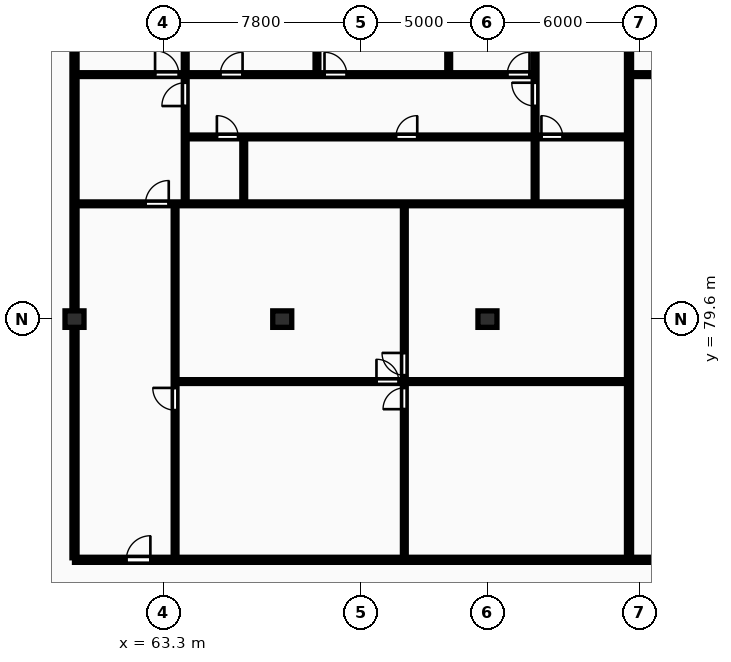
"""IFC4 building model, lengths in metres.
Left out: names, types, materials, properties, quantities, classifications, styles, units other than length and angle.
Written with IfcOpenShell. Run it as: python <this file> out.ifc"""

import sys

from ifc_helpers import new_model, si_unit, direction, frame, frame_2d, origin, origin_2d, place, context, subcontext, project, spatial, rectangle, extrude, element, fill, save


model = new_model("IFC4")
c1 = context("Model", 3, precision=1e-05, world=origin(), true_north=direction((0.0, 1.0)))
c2 = subcontext(c1, "Body", "Model", "MODEL_VIEW")
j1 = project(units=[si_unit("LENGTHUNIT", "METRE"), si_unit("PLANEANGLEUNIT", "RADIAN")], contexts=[c1])
p1 = place(None, origin())
s1 = spatial("IfcSite", under=j1, at=p1, CompositionType="ELEMENT")
p2 = place(p1, origin())
s2 = spatial("IfcBuilding", under=s1, at=p2, CompositionType="ELEMENT")
p3 = place(p2, frame((0.0, 0.0, 235.55)))
s3 = spatial("IfcBuildingStorey", under=s2, at=p3, CompositionType="ELEMENT", Elevation=235.55)
for number, where, z_axis, x_axis in (
    (1, (59.8, 79.6, 0.0), (0.0, 0.0, 1.0), (1.0, 0.0, 0.0)),
    (2, (68.0, 79.6, 0.0), (0.0, 0.0, 1.0), (1.0, 0.0, 0.0)),
    (3, (76.1, 79.6, 0.0), (0.0, 0.0, 1.0), (1.0, 0.0, 0.0)),
):
    element("IfcColumn", number, at=place(p3, frame(where, z_axis=z_axis, x_axis=x_axis)), inside=s3, PredefinedType="COLUMN", context=c2, shape_type="SweptSolid", body=[
        extrude(rectangle(XDim=0.75, YDim=0.65, at=origin_2d()), origin(), (0.0, 0.0, 1.0), 3.45),
    ])
p4 = place(p3, frame((59.8, 70.18, 0.0), z_axis=(0.0, 0.0, 1.0), x_axis=(0.0, 1.0, 0.0)))
e4 = element("IfcWall", 4, at=p4, inside=s3, PredefinedType="PARTITIONING", context=c2, shape_type="SweptSolid", body=[
    extrude(rectangle(XDim=24.32, YDim=0.2, at=frame_2d((12.16, 0.0))), origin(), (0.0, 0.0, 1.0), 2.477),
])
p5 = place(p3, frame((81.687, 70.18, 0.0), z_axis=(0.0, 0.0, 1.0), x_axis=(0.0, 1.0, 0.0)))
e5 = element("IfcWall", 5, at=p5, inside=s3, PredefinedType="PARTITIONING", context=c2, shape_type="SweptSolid", body=[
    extrude(rectangle(XDim=24.32, YDim=0.2, at=frame_2d((12.16, 0.0))), origin(), (0.0, 0.0, 1.0), 3.17),
])
p6 = place(p3, frame((72.819, 70.16, 0.0), z_axis=(0.0, 0.0, 1.0), x_axis=(0.0, 1.0, 0.0)))
e6 = element("IfcWall", 6, at=p6, inside=s3, PredefinedType="PARTITIONING", context=c2, shape_type="SweptSolid", body=[
    extrude(rectangle(XDim=13.95, YDim=0.15, at=frame_2d((6.975, 0.0))), origin(), (0.0, 0.0, 1.0), 3.17),
])
p7 = place(p6, frame((5.885, 0.0, 0.0)))
e7 = element("IfcOpeningElement", 7, at=p7, cuts=e6, PredefinedType="OPENING", context=c2, shape_type="SweptSolid", body=[
    extrude(rectangle(XDim=0.84, YDim=2.04, at=frame_2d((0.42, 1.02))), frame((0.0, 0.085, 0.0), z_axis=(0.0, -1.0, 0.0), x_axis=(1.0, 0.0, 0.0)), (0.0, 0.0, 1.0), 0.17),
])
p8 = place(p6, frame((7.225, 0.0, 0.0)))
e8 = element("IfcOpeningElement", 8, at=p8, cuts=e6, PredefinedType="OPENING", context=c2, shape_type="SweptSolid", body=[
    extrude(rectangle(XDim=0.88, YDim=2.06, at=frame_2d((0.44, 1.03))), frame((0.0, 0.085, 0.0), z_axis=(0.0, -1.0, 0.0), x_axis=(1.0, 0.0, 0.0)), (0.0, 0.0, 1.0), 0.17),
])
p9 = place(p3, frame((63.83, 77.135, 0.0), z_axis=(0.0, 0.0, 1.0), x_axis=(1.0, 0.0, 0.0)))
e9 = element("IfcWall", 9, at=p9, inside=s3, PredefinedType="PARTITIONING", context=c2, shape_type="SweptSolid", body=[
    extrude(rectangle(XDim=17.777, YDim=0.15, at=frame_2d((8.889, 0.0))), origin(), (0.0, 0.0, 1.0), 3.17),
])
p10 = place(p9, frame((7.889, 0.0, 0.0)))
e10 = element("IfcOpeningElement", 10, at=p10, cuts=e9, PredefinedType="OPENING", context=c2, shape_type="SweptSolid", body=[
    extrude(rectangle(XDim=0.88, YDim=2.06, at=frame_2d((0.44, 1.03))), frame((0.0, 0.085, 0.0), z_axis=(0.0, -1.0, 0.0), x_axis=(1.0, 0.0, 0.0)), (0.0, 0.0, 1.0), 0.17),
])
p11 = place(p3, frame((63.77, 70.16, 0.0), z_axis=(0.0, 0.0, 1.0), x_axis=(0.0, 1.0, 0.0)))
e11 = element("IfcWall", 11, at=p11, inside=s3, PredefinedType="PARTITIONING", context=c2, shape_type="SweptSolid", body=[
    extrude(rectangle(XDim=13.95, YDim=0.15, at=frame_2d((6.975, 0.0))), origin(), (0.0, 0.0, 1.0), 3.17),
])
p12 = place(p11, frame((5.845, 0.0, 0.0)))
e12 = element("IfcOpeningElement", 12, at=p12, cuts=e11, PredefinedType="OPENING", context=c2, shape_type="SweptSolid", body=[
    extrude(rectangle(XDim=0.88, YDim=2.06, at=frame_2d((0.44, 1.03))), frame((0.0, 0.085, 0.0), z_axis=(0.0, -1.0, 0.0), x_axis=(1.0, 0.0, 0.0)), (0.0, 0.0, 1.0), 0.17),
])
p13 = place(p3, frame((66.48, 84.19, 0.0), z_axis=(0.0, 0.0, 1.0), x_axis=(0.0, 1.0, 0.0)))
e13 = element("IfcWall", 13, at=p13, inside=s3, PredefinedType="PARTITIONING", context=c2, shape_type="SweptSolid", body=[
    extrude(rectangle(XDim=2.58, YDim=0.15, at=frame_2d((1.29, 0.0))), origin(), (0.0, 0.0, 1.0), 3.17),
])
for number, where, z_axis, x_axis in (
    (14, (69.37, 89.33, 0.0), (0.0, 0.0, 1.0), (0.0, 1.0, 0.0)),
    (15, (74.57, 89.33, 0.0), (0.0, 0.0, 1.0), (0.0, 1.0, 0.0)),
):
    element("IfcWall", number, at=place(p3, frame(where, z_axis=z_axis, x_axis=x_axis)), inside=s3, PredefinedType="PARTITIONING", context=c2, shape_type="SweptSolid", body=[
        extrude(rectangle(XDim=5.17, YDim=0.15, at=frame_2d((2.585, 0.0))), origin(), (0.0, 0.0, 1.0), 3.17),
    ])
p14 = place(p3, frame((64.17, 84.19, 0.0), z_axis=(0.0, 0.0, 1.0), x_axis=(0.0, 1.0, 0.0)))
e16 = element("IfcWall", 16, at=p14, inside=s3, PredefinedType="PARTITIONING", context=c2, shape_type="SweptSolid", body=[
    extrude(rectangle(XDim=10.31, YDim=0.15, at=frame_2d((5.155, 0.0))), origin(), (0.0, 0.0, 1.0), 3.17),
])
p15 = place(p14, frame((3.82, 0.0, 0.0)))
e17 = element("IfcOpeningElement", 17, at=p15, cuts=e16, PredefinedType="OPENING", context=c2, shape_type="SweptSolid", body=[
    extrude(rectangle(XDim=0.92, YDim=2.08, at=frame_2d((0.46, 1.04))), frame((0.0, 0.085, 0.0), z_axis=(0.0, -1.0, 0.0), x_axis=(1.0, 0.0, 0.0)), (0.0, 0.0, 1.0), 0.17),
])
p16 = place(p3, frame((77.98, 84.19, 0.0), z_axis=(0.0, 0.0, 1.0), x_axis=(0.0, 1.0, 0.0)))
e18 = element("IfcWall", 18, at=p16, inside=s3, PredefinedType="PARTITIONING", context=c2, shape_type="SweptSolid", body=[
    extrude(rectangle(XDim=2.58, YDim=0.15, at=frame_2d((1.29, 0.0))), origin(), (0.0, 0.0, 1.0), 3.17),
])
p17 = place(p3, frame((77.98, 86.81, 0.0), z_axis=(0.0, 0.0, 1.0), x_axis=(0.0, 1.0, 0.0)))
e19 = element("IfcWall", 19, at=p17, inside=s3, PredefinedType="PARTITIONING", context=c2, shape_type="SweptSolid", body=[
    extrude(rectangle(XDim=7.69, YDim=0.15, at=frame_2d((3.845, 0.0))), origin(), (0.0, 0.0, 1.0), 3.17),
])
p18 = place(p17, frame((1.2, 0.0, 0.0)))
e20 = element("IfcOpeningElement", 20, at=p18, cuts=e19, PredefinedType="OPENING", context=c2, shape_type="SweptSolid", body=[
    extrude(rectangle(XDim=0.92, YDim=2.08, at=frame_2d((0.46, 1.04))), frame((0.0, 0.085, 0.0), z_axis=(0.0, -1.0, 0.0), x_axis=(1.0, 0.0, 0.0)), (0.0, 0.0, 1.0), 0.17),
])
p19 = place(p3, frame((64.21, 86.79, 0.0), z_axis=(0.0, 0.0, 1.0), x_axis=(1.0, 0.0, 0.0)))
e21 = element("IfcWall", 21, at=p19, inside=s3, PredefinedType="PARTITIONING", context=c2, shape_type="SweptSolid", body=[
    extrude(rectangle(XDim=17.397, YDim=0.15, at=frame_2d((8.699, 0.0))), origin(), (0.0, 0.0, 1.0), 3.17),
])
p20 = place(p19, frame((1.21, 0.0, 0.0)))
e22 = element("IfcOpeningElement", 22, at=p20, cuts=e21, PredefinedType="OPENING", context=c2, shape_type="SweptSolid", body=[
    extrude(rectangle(XDim=0.84, YDim=2.04, at=frame_2d((0.42, 1.02))), frame((0.0, 0.085, 0.0), z_axis=(0.0, -1.0, 0.0), x_axis=(1.0, 0.0, 0.0)), (0.0, 0.0, 1.0), 0.17),
])
p21 = place(p19, frame((8.279, 0.0, 0.0)))
e23 = element("IfcOpeningElement", 23, at=p21, cuts=e21, PredefinedType="OPENING", context=c2, shape_type="SweptSolid", body=[
    extrude(rectangle(XDim=0.84, YDim=2.04, at=frame_2d((0.42, 1.02))), frame((0.0, 0.085, 0.0), z_axis=(0.0, -1.0, 0.0), x_axis=(1.0, 0.0, 0.0)), (0.0, 0.0, 1.0), 0.17),
])
p22 = place(p19, frame((14.02, 0.0, 0.0)))
e24 = element("IfcOpeningElement", 24, at=p22, cuts=e21, PredefinedType="OPENING", context=c2, shape_type="SweptSolid", body=[
    extrude(rectangle(XDim=0.84, YDim=2.04, at=frame_2d((0.42, 1.02))), frame((0.0, 0.085, 0.0), z_axis=(0.0, -1.0, 0.0), x_axis=(1.0, 0.0, 0.0)), (0.0, 0.0, 1.0), 0.17),
])
p23 = place(p3, frame((59.88, 84.15, 0.0), z_axis=(0.0, 0.0, 1.0), x_axis=(1.0, 0.0, 0.0)))
e25 = element("IfcWall", 25, at=p23, inside=s3, PredefinedType="PARTITIONING", context=c2, shape_type="SweptSolid", body=[
    extrude(rectangle(XDim=21.728, YDim=0.15, at=frame_2d((10.864, 0.0))), origin(), (0.0, 0.0, 1.0), 3.17),
])
p24 = place(p23, frame((2.72, 0.0, 0.0)))
e26 = element("IfcOpeningElement", 26, at=p24, cuts=e25, PredefinedType="OPENING", context=c2, shape_type="SweptSolid", body=[
    extrude(rectangle(XDim=0.92, YDim=2.08, at=frame_2d((0.46, 1.04))), frame((0.0, 0.085, 0.0), z_axis=(0.0, -1.0, 0.0), x_axis=(1.0, 0.0, 0.0)), (0.0, 0.0, 1.0), 0.17),
])
p25 = place(p3, frame((59.88, 89.25, 0.0), z_axis=(0.0, 0.0, 1.0), x_axis=(1.0, 0.0, 0.0)))
e27 = element("IfcWall", 27, at=p25, inside=s3, PredefinedType="PARTITIONING", context=c2, shape_type="SweptSolid", body=[
    extrude(rectangle(XDim=18.1, YDim=0.15, at=frame_2d((9.05, 0.0))), origin(), (0.0, 0.0, 1.0), 3.17),
])
p26 = place(p25, frame((3.1, 0.0, 0.0)))
e28 = element("IfcOpeningElement", 28, at=p26, cuts=e27, PredefinedType="OPENING", context=c2, shape_type="SweptSolid", body=[
    extrude(rectangle(XDim=0.94, YDim=2.1, at=frame_2d((0.47, 1.05))), frame((0.0, 0.085, 0.0), z_axis=(0.0, -1.0, 0.0), x_axis=(1.0, 0.0, 0.0)), (0.0, 0.0, 1.0), 0.17),
])
p27 = place(p25, frame((5.674, 0.0, 0.0)))
e29 = element("IfcOpeningElement", 29, at=p27, cuts=e27, PredefinedType="OPENING", context=c2, shape_type="SweptSolid", body=[
    extrude(rectangle(XDim=0.88, YDim=2.06, at=frame_2d((0.44, 1.03))), frame((0.0, 0.085, 0.0), z_axis=(0.0, -1.0, 0.0), x_axis=(1.0, 0.0, 0.0)), (0.0, 0.0, 1.0), 0.17),
])
p28 = place(p25, frame((9.788, 0.0, 0.0)))
e30 = element("IfcOpeningElement", 30, at=p28, cuts=e27, PredefinedType="OPENING", context=c2, shape_type="SweptSolid", body=[
    extrude(rectangle(XDim=0.88, YDim=2.06, at=frame_2d((0.44, 1.03))), frame((0.0, 0.085, 0.0), z_axis=(0.0, -1.0, 0.0), x_axis=(1.0, 0.0, 0.0)), (0.0, 0.0, 1.0), 0.17),
])
p29 = place(p25, frame((17.0, 0.0, 0.0)))
e31 = element("IfcOpeningElement", 31, at=p29, cuts=e27, PredefinedType="OPENING", context=c2, shape_type="SweptSolid", body=[
    extrude(rectangle(XDim=0.88, YDim=2.06, at=frame_2d((0.44, 1.03))), frame((0.0, 0.085, 0.0), z_axis=(0.0, -1.0, 0.0), x_axis=(1.0, 0.0, 0.0)), (0.0, 0.0, 1.0), 0.17),
])
p30 = place(p3, frame((81.767, 89.25, 0.0), z_axis=(0.0, 0.0, 1.0), x_axis=(1.0, 0.0, 0.0)))
e32 = element("IfcWall", 32, at=p30, inside=s3, PredefinedType="PARTITIONING", context=c2, shape_type="SweptSolid", body=[
    extrude(rectangle(XDim=17.708, YDim=0.15, at=frame_2d((8.854, 0.0))), origin(), (0.0, 0.0, 1.0), 3.17),
])
p31 = place(p30, frame((6.359, 0.0, 0.0)))
e33 = element("IfcOpeningElement", 33, at=p31, cuts=e32, PredefinedType="OPENING", context=c2, shape_type="SweptSolid", body=[
    extrude(rectangle(XDim=0.94, YDim=2.1, at=frame_2d((0.47, 1.05))), frame((0.0, 0.085, 0.0), z_axis=(0.0, -1.0, 0.0), x_axis=(1.0, 0.0, 0.0)), (0.0, 0.0, 1.0), 0.17),
])
p32 = place(p30, frame((8.384, 0.0, 0.0)))
e34 = element("IfcOpeningElement", 34, at=p32, cuts=e32, PredefinedType="OPENING", context=c2, shape_type="SweptSolid", body=[
    extrude(rectangle(XDim=0.94, YDim=2.1, at=frame_2d((0.47, 1.05))), frame((0.0, 0.085, 0.0), z_axis=(0.0, -1.0, 0.0), x_axis=(1.0, 0.0, 0.0)), (0.0, 0.0, 1.0), 0.17),
])
p33 = place(p3, frame((59.8, 70.1, 0.0), z_axis=(0.0, 0.0, 1.0), x_axis=(1.0, 0.0, 0.0)))
e35 = element("IfcWall", 35, at=p33, inside=s3, PredefinedType="PARTITIONING", context=c2, shape_type="SweptSolid", body=[
    extrude(rectangle(XDim=68.6, YDim=0.2, at=frame_2d((34.3, 0.0))), origin(), (0.0, 0.0, 1.0), 3.17),
])
p34 = place(p33, frame((2.045, 0.0, 0.0)))
e36 = element("IfcOpeningElement", 36, at=p34, cuts=e35, PredefinedType="OPENING", context=c2, shape_type="SweptSolid", body=[
    extrude(rectangle(XDim=0.95, YDim=2.15, at=frame_2d((0.475, 1.075))), frame((0.0, 0.11, 0.0), z_axis=(0.0, -1.0, 0.0), x_axis=(1.0, 0.0, 0.0)), (0.0, 0.0, 1.0), 0.22),
])
p35 = place(p33, frame((29.246, 0.0, 0.0)))
e37 = element("IfcOpeningElement", 37, at=p35, cuts=e35, PredefinedType="OPENING", context=c2, shape_type="SweptSolid", body=[
    extrude(rectangle(XDim=1.22, YDim=2.18, at=frame_2d((0.61, 1.09))), frame((0.0, 0.11, 0.0), z_axis=(0.0, -1.0, 0.0), x_axis=(1.0, 0.0, 0.0)), (0.0, 0.0, 1.0), 0.22),
])
p36 = place(p33, frame((41.801, 0.0, 0.0)))
e38 = element("IfcOpeningElement", 38, at=p36, cuts=e35, PredefinedType="OPENING", context=c2, shape_type="SweptSolid", body=[
    extrude(rectangle(XDim=0.95, YDim=2.15, at=frame_2d((0.475, 1.075))), frame((0.0, 0.11, 0.0), z_axis=(0.0, -1.0, 0.0), x_axis=(1.0, 0.0, 0.0)), (0.0, 0.0, 1.0), 0.22),
])
p37 = place(p33, frame((59.115, 0.0, 0.0)))
e39 = element("IfcOpeningElement", 39, at=p37, cuts=e35, PredefinedType="OPENING", context=c2, shape_type="SweptSolid", body=[
    extrude(rectangle(XDim=0.95, YDim=2.15, at=frame_2d((0.475, 1.075))), frame((0.0, 0.11, 0.0), z_axis=(0.0, -1.0, 0.0), x_axis=(1.0, 0.0, 0.0)), (0.0, 0.0, 1.0), 0.22),
])
p38 = place(p7, origin())
e40 = element("IfcDoor", 40, at=p38, inside=s3, OperationType="SINGLE_SWING_LEFT", PredefinedType="DOOR", context=c2, shape_type="SweptSolid", body=[
    extrude(rectangle(XDim=0.84, YDim=2.04, at=frame_2d((0.42, 1.02))), frame((0.0, 0.025, 0.0), z_axis=(0.0, -1.0, 0.0), x_axis=(1.0, 0.0, 0.0)), (0.0, 0.0, 1.0), 0.05),
])
fill(e7, e40)
p39 = place(p8, origin())
e41 = element("IfcDoor", 41, at=p39, inside=s3, OperationType="SINGLE_SWING_RIGHT", PredefinedType="DOOR", context=c2, shape_type="SweptSolid", body=[
    extrude(rectangle(XDim=0.88, YDim=2.06, at=frame_2d((0.44, 1.03))), frame((0.0, 0.025, 0.0), z_axis=(0.0, -1.0, 0.0), x_axis=(1.0, 0.0, 0.0)), (0.0, 0.0, 1.0), 0.05),
])
fill(e8, e41)
p40 = place(p10, origin())
e42 = element("IfcDoor", 42, at=p40, inside=s3, OperationType="SINGLE_SWING_LEFT", PredefinedType="DOOR", context=c2, shape_type="SweptSolid", body=[
    extrude(rectangle(XDim=0.88, YDim=2.06, at=frame_2d((0.44, 1.03))), frame((0.0, 0.025, 0.0), z_axis=(0.0, -1.0, 0.0), x_axis=(1.0, 0.0, 0.0)), (0.0, 0.0, 1.0), 0.05),
])
fill(e10, e42)
p41 = place(p12, origin())
e43 = element("IfcDoor", 43, at=p41, inside=s3, OperationType="SINGLE_SWING_RIGHT", PredefinedType="DOOR", context=c2, shape_type="SweptSolid", body=[
    extrude(rectangle(XDim=0.88, YDim=2.06, at=frame_2d((0.44, 1.03))), frame((0.0, 0.025, 0.0), z_axis=(0.0, -1.0, 0.0), x_axis=(1.0, 0.0, 0.0)), (0.0, 0.0, 1.0), 0.05),
])
fill(e12, e43)
p42 = place(p15, origin())
e44 = element("IfcDoor", 44, at=p42, inside=s3, OperationType="SINGLE_SWING_LEFT", PredefinedType="DOOR", context=c2, shape_type="SweptSolid", body=[
    extrude(rectangle(XDim=0.92, YDim=2.08, at=frame_2d((0.46, 1.04))), frame((0.0, 0.025, 0.0), z_axis=(0.0, -1.0, 0.0), x_axis=(1.0, 0.0, 0.0)), (0.0, 0.0, 1.0), 0.05),
])
fill(e17, e44)
p43 = place(p18, origin())
e45 = element("IfcDoor", 45, at=p43, inside=s3, OperationType="SINGLE_SWING_RIGHT", PredefinedType="DOOR", context=c2, shape_type="SweptSolid", body=[
    extrude(rectangle(XDim=0.92, YDim=2.08, at=frame_2d((0.46, 1.04))), frame((0.0, 0.025, 0.0), z_axis=(0.0, -1.0, 0.0), x_axis=(1.0, 0.0, 0.0)), (0.0, 0.0, 1.0), 0.05),
])
fill(e20, e45)
p44 = place(p20, origin())
e46 = element("IfcDoor", 46, at=p44, inside=s3, OperationType="SINGLE_SWING_LEFT", PredefinedType="DOOR", context=c2, shape_type="SweptSolid", body=[
    extrude(rectangle(XDim=0.84, YDim=2.04, at=frame_2d((0.42, 1.02))), frame((0.0, 0.025, 0.0), z_axis=(0.0, -1.0, 0.0), x_axis=(1.0, 0.0, 0.0)), (0.0, 0.0, 1.0), 0.05),
])
fill(e22, e46)
p45 = place(p21, origin())
e47 = element("IfcDoor", 47, at=p45, inside=s3, OperationType="SINGLE_SWING_RIGHT", PredefinedType="DOOR", context=c2, shape_type="SweptSolid", body=[
    extrude(rectangle(XDim=0.84, YDim=2.04, at=frame_2d((0.42, 1.02))), frame((0.0, 0.025, 0.0), z_axis=(0.0, -1.0, 0.0), x_axis=(1.0, 0.0, 0.0)), (0.0, 0.0, 1.0), 0.05),
])
fill(e23, e47)
p46 = place(p22, origin())
e48 = element("IfcDoor", 48, at=p46, inside=s3, OperationType="SINGLE_SWING_LEFT", PredefinedType="DOOR", context=c2, shape_type="SweptSolid", body=[
    extrude(rectangle(XDim=0.84, YDim=2.04, at=frame_2d((0.42, 1.02))), frame((0.0, 0.025, 0.0), z_axis=(0.0, -1.0, 0.0), x_axis=(1.0, 0.0, 0.0)), (0.0, 0.0, 1.0), 0.05),
])
fill(e24, e48)
p47 = place(p24, origin())
e49 = element("IfcDoor", 49, at=p47, inside=s3, OperationType="SINGLE_SWING_RIGHT", PredefinedType="DOOR", context=c2, shape_type="SweptSolid", body=[
    extrude(rectangle(XDim=0.92, YDim=2.08, at=frame_2d((0.46, 1.04))), frame((0.0, 0.025, 0.0), z_axis=(0.0, -1.0, 0.0), x_axis=(1.0, 0.0, 0.0)), (0.0, 0.0, 1.0), 0.05),
])
fill(e26, e49)
p48 = place(p26, origin())
e50 = element("IfcDoor", 50, at=p48, inside=s3, OperationType="SINGLE_SWING_LEFT", PredefinedType="DOOR", context=c2, shape_type="SweptSolid", body=[
    extrude(rectangle(XDim=0.94, YDim=2.1, at=frame_2d((0.47, 1.05))), frame((0.0, 0.025, 0.0), z_axis=(0.0, -1.0, 0.0), x_axis=(1.0, 0.0, 0.0)), (0.0, 0.0, 1.0), 0.05),
])
fill(e28, e50)
p49 = place(p27, origin())
e51 = element("IfcDoor", 51, at=p49, inside=s3, OperationType="SINGLE_SWING_RIGHT", PredefinedType="DOOR", context=c2, shape_type="SweptSolid", body=[
    extrude(rectangle(XDim=0.88, YDim=2.06, at=frame_2d((0.44, 1.03))), frame((0.0, 0.025, 0.0), z_axis=(0.0, -1.0, 0.0), x_axis=(1.0, 0.0, 0.0)), (0.0, 0.0, 1.0), 0.05),
])
fill(e29, e51)
p50 = place(p28, origin())
e52 = element("IfcDoor", 52, at=p50, inside=s3, OperationType="SINGLE_SWING_LEFT", PredefinedType="DOOR", context=c2, shape_type="SweptSolid", body=[
    extrude(rectangle(XDim=0.88, YDim=2.06, at=frame_2d((0.44, 1.03))), frame((0.0, 0.025, 0.0), z_axis=(0.0, -1.0, 0.0), x_axis=(1.0, 0.0, 0.0)), (0.0, 0.0, 1.0), 0.05),
])
fill(e30, e52)
p51 = place(p29, origin())
e53 = element("IfcDoor", 53, at=p51, inside=s3, OperationType="SINGLE_SWING_RIGHT", PredefinedType="DOOR", context=c2, shape_type="SweptSolid", body=[
    extrude(rectangle(XDim=0.88, YDim=2.06, at=frame_2d((0.44, 1.03))), frame((0.0, 0.025, 0.0), z_axis=(0.0, -1.0, 0.0), x_axis=(1.0, 0.0, 0.0)), (0.0, 0.0, 1.0), 0.05),
])
fill(e31, e53)
p52 = place(p34, origin())
e54 = element("IfcDoor", 54, at=p52, inside=s3, OperationType="SINGLE_SWING_RIGHT", PredefinedType="DOOR", context=c2, shape_type="SweptSolid", body=[
    extrude(rectangle(XDim=0.95, YDim=2.15, at=frame_2d((0.475, 1.075))), frame((0.0, 0.025, 0.0), z_axis=(0.0, -1.0, 0.0), x_axis=(1.0, 0.0, 0.0)), (0.0, 0.0, 1.0), 0.05),
])
fill(e36, e54)
save(model, sys.argv[1])
